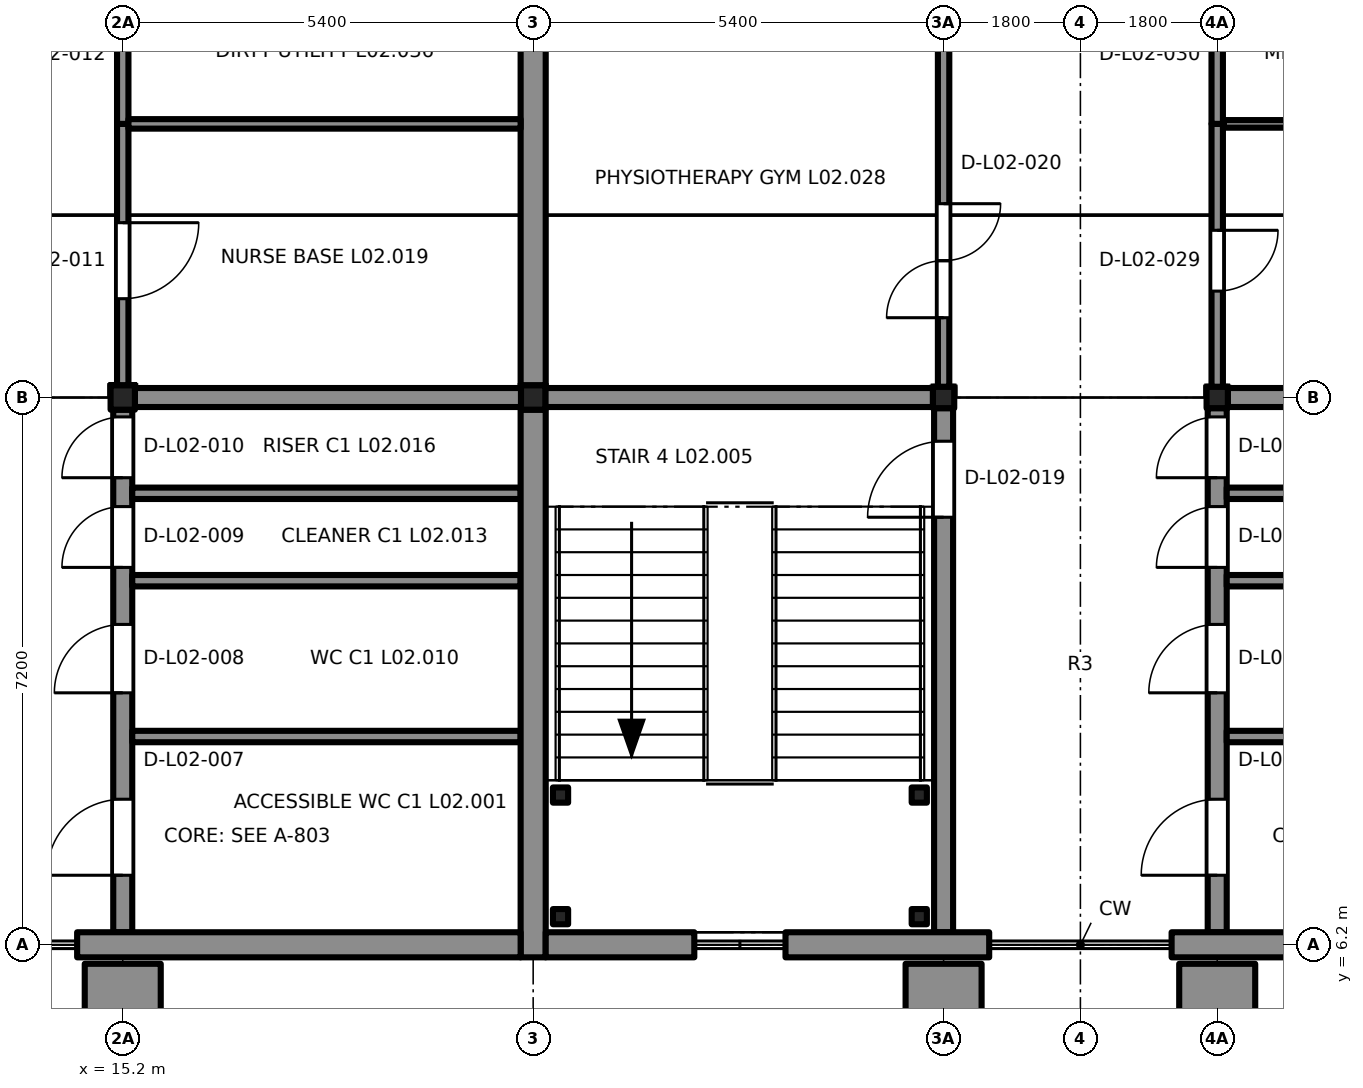
"""IFC4 building model, lengths in metres.
Left out: names, types, materials, properties, quantities, classifications, styles, units other than length and angle.
Written with IfcOpenShell. Run it as: python <this file> out.ifc"""

import sys

from ifc_helpers import new_model, si_unit, direction, frame, frame_2d, origin, origin_2d, place, context, subcontext, project, spatial, rectangle, extrude, element, fill, save


model = new_model("IFC4")
c1 = context("Model", 3, precision=1e-05, world=origin(), true_north=direction((0.0, 1.0)))
c2 = subcontext(c1, "Body", "Model", "MODEL_VIEW")
j1 = project(units=[si_unit("LENGTHUNIT", "METRE"), si_unit("PLANEANGLEUNIT", "RADIAN")], contexts=[c1])
p1 = place(None, origin())
s1 = spatial("IfcSite", under=j1, at=p1, CompositionType="ELEMENT")
p2 = place(p1, origin())
s2 = spatial("IfcBuilding", under=s1, at=p2, CompositionType="ELEMENT")
p3 = place(p2, frame((0.0, 0.0, 10.2)))
s3 = spatial("IfcBuildingStorey", under=s2, at=p3, CompositionType="ELEMENT", Elevation=10.2)
for number, where, z_axis, x_axis in (
    (1, (15.2, 13.4, 0.0), (0.0, 0.0, 1.0), (1.0, 0.0, 0.0)),
    (2, (20.6, 13.4, 0.0), (0.0, 0.0, 1.0), (1.0, 0.0, 0.0)),
):
    element("IfcColumn", number, at=place(p3, frame(where, z_axis=z_axis, x_axis=x_axis)), inside=s3, PredefinedType="COLUMN", context=c2, shape_type="SweptSolid", body=[
        extrude(rectangle(XDim=0.32, YDim=0.32, at=origin_2d()), origin(), (0.0, 0.0, 1.0), 3.9),
    ])
for number, where, z_axis, x_axis in (
    (3, (26.0, 13.4, 0.0), (0.0, 0.0, 1.0), (1.0, 0.0, 0.0)),
    (4, (29.6, 13.4, 0.0), (0.0, 0.0, 1.0), (1.0, 0.0, 0.0)),
):
    element("IfcColumn", number, at=place(p3, frame(where, z_axis=z_axis, x_axis=x_axis)), inside=s3, PredefinedType="COLUMN", context=c2, shape_type="SweptSolid", body=[
        extrude(rectangle(XDim=0.28, YDim=0.28, at=origin_2d()), origin(), (0.0, 0.0, 1.0), 3.9),
    ])
p4 = place(p3, frame((15.2, 6.365, 0.0), z_axis=(0.0, 0.0, 1.0), x_axis=(0.0, 1.0, 0.0)))
e5 = element("IfcWall", 5, at=p4, inside=s3, PredefinedType="SHEAR", context=c2, shape_type="SweptSolid", body=[
    extrude(rectangle(XDim=6.875, YDim=0.25, at=frame_2d((3.438, 0.0))), origin(), (0.0, 0.0, 1.0), 3.65),
])
p5 = place(p4, frame((0.75, 0.0, 0.0)))
e6 = element("IfcOpeningElement", 6, at=p5, cuts=e5, PredefinedType="OPENING", context=c2, shape_type="SweptSolid", body=[
    extrude(rectangle(XDim=1.0, YDim=2.1, at=frame_2d((0.5, 1.05))), frame((0.0, 0.135, 0.0), z_axis=(0.0, -1.0, 0.0), x_axis=(1.0, 0.0, 0.0)), (0.0, 0.0, 1.0), 0.27),
])
p6 = place(p4, frame((3.15, 0.0, 0.0)))
e7 = element("IfcOpeningElement", 7, at=p6, cuts=e5, PredefinedType="OPENING", context=c2, shape_type="SweptSolid", body=[
    extrude(rectangle(XDim=0.9, YDim=2.1, at=frame_2d((0.45, 1.05))), frame((0.0, 0.135, 0.0), z_axis=(0.0, -1.0, 0.0), x_axis=(1.0, 0.0, 0.0)), (0.0, 0.0, 1.0), 0.27),
])
p7 = place(p4, frame((4.8, 0.0, 0.0)))
e8 = element("IfcOpeningElement", 8, at=p7, cuts=e5, PredefinedType="OPENING", context=c2, shape_type="SweptSolid", body=[
    extrude(rectangle(XDim=0.8, YDim=2.1, at=frame_2d((0.4, 1.05))), frame((0.0, 0.135, 0.0), z_axis=(0.0, -1.0, 0.0), x_axis=(1.0, 0.0, 0.0)), (0.0, 0.0, 1.0), 0.27),
])
p8 = place(p4, frame((5.98, 0.0, 0.0)))
e9 = element("IfcOpeningElement", 9, at=p8, cuts=e5, PredefinedType="OPENING", context=c2, shape_type="SweptSolid", body=[
    extrude(rectangle(XDim=0.8, YDim=2.1, at=frame_2d((0.4, 1.05))), frame((0.0, 0.135, 0.0), z_axis=(0.0, -1.0, 0.0), x_axis=(1.0, 0.0, 0.0)), (0.0, 0.0, 1.0), 0.27),
])
p9 = place(p3, frame((15.36, 13.4, 0.0), z_axis=(0.0, 0.0, 1.0), x_axis=(1.0, 0.0, 0.0)))
e10 = element("IfcWall", 10, at=p9, inside=s3, PredefinedType="SHEAR", context=c2, shape_type="SweptSolid", body=[
    extrude(rectangle(XDim=5.08, YDim=0.25, at=frame_2d((2.54, 0.0))), origin(), (0.0, 0.0, 1.0), 3.65),
])
for number, where, z_axis, x_axis in (
    (11, (15.325, 8.94, 0.0), (0.0, 0.0, 1.0), (1.0, 0.0, 0.0)),
    (12, (15.325, 10.99, 0.0), (0.0, 0.0, 1.0), (1.0, 0.0, 0.0)),
    (13, (15.325, 12.14, 0.0), (0.0, 0.0, 1.0), (1.0, 0.0, 0.0)),
):
    element("IfcWall", number, at=place(p3, frame(where, z_axis=z_axis, x_axis=x_axis)), inside=s3, PredefinedType="PARTITIONING", context=c2, shape_type="SweptSolid", body=[
        extrude(rectangle(XDim=5.11, YDim=0.15, at=frame_2d((2.555, 0.0))), origin(), (0.0, 0.0, 1.0), 3.65),
    ])
p10 = place(p3, frame((26.0, 6.365, 0.0), z_axis=(0.0, 0.0, 1.0), x_axis=(0.0, 1.0, 0.0)))
e14 = element("IfcWall", 14, at=p10, inside=s3, PredefinedType="SHEAR", context=c2, shape_type="SweptSolid", body=[
    extrude(rectangle(XDim=6.895, YDim=0.25, at=frame_2d((3.448, 0.0))), origin(), (0.0, 0.0, 1.0), 3.65),
])
p11 = place(p10, frame((5.46, 0.0, 0.0)))
e15 = element("IfcOpeningElement", 15, at=p11, cuts=e14, PredefinedType="OPENING", context=c2, shape_type="SweptSolid", body=[
    extrude(rectangle(XDim=1.0, YDim=2.1, at=frame_2d((0.5, 1.05))), frame((0.0, 0.135, 0.0), z_axis=(0.0, -1.0, 0.0), x_axis=(1.0, 0.0, 0.0)), (0.0, 0.0, 1.0), 0.27),
])
p12 = place(p3, frame((20.76, 13.4, 0.0), z_axis=(0.0, 0.0, 1.0), x_axis=(1.0, 0.0, 0.0)))
e16 = element("IfcWall", 16, at=p12, inside=s3, PredefinedType="SHEAR", context=c2, shape_type="SweptSolid", body=[
    extrude(rectangle(XDim=5.1, YDim=0.25, at=frame_2d((2.55, 0.0))), origin(), (0.0, 0.0, 1.0), 3.65),
])
p13 = place(p3, frame((29.6, 6.365, 0.0), z_axis=(0.0, 0.0, 1.0), x_axis=(0.0, 1.0, 0.0)))
e17 = element("IfcWall", 17, at=p13, inside=s3, PredefinedType="SHEAR", context=c2, shape_type="SweptSolid", body=[
    extrude(rectangle(XDim=6.895, YDim=0.25, at=frame_2d((3.448, 0.0))), origin(), (0.0, 0.0, 1.0), 3.65),
])
p14 = place(p13, frame((0.75, 0.0, 0.0)))
e18 = element("IfcOpeningElement", 18, at=p14, cuts=e17, PredefinedType="OPENING", context=c2, shape_type="SweptSolid", body=[
    extrude(rectangle(XDim=1.0, YDim=2.1, at=frame_2d((0.5, 1.05))), frame((0.0, 0.135, 0.0), z_axis=(0.0, -1.0, 0.0), x_axis=(1.0, 0.0, 0.0)), (0.0, 0.0, 1.0), 0.27),
])
p15 = place(p13, frame((3.15, 0.0, 0.0)))
e19 = element("IfcOpeningElement", 19, at=p15, cuts=e17, PredefinedType="OPENING", context=c2, shape_type="SweptSolid", body=[
    extrude(rectangle(XDim=0.9, YDim=2.1, at=frame_2d((0.45, 1.05))), frame((0.0, 0.135, 0.0), z_axis=(0.0, -1.0, 0.0), x_axis=(1.0, 0.0, 0.0)), (0.0, 0.0, 1.0), 0.27),
])
p16 = place(p13, frame((4.8, 0.0, 0.0)))
e20 = element("IfcOpeningElement", 20, at=p16, cuts=e17, PredefinedType="OPENING", context=c2, shape_type="SweptSolid", body=[
    extrude(rectangle(XDim=0.8, YDim=2.1, at=frame_2d((0.4, 1.05))), frame((0.0, 0.135, 0.0), z_axis=(0.0, -1.0, 0.0), x_axis=(1.0, 0.0, 0.0)), (0.0, 0.0, 1.0), 0.27),
])
p17 = place(p13, frame((5.98, 0.0, 0.0)))
e21 = element("IfcOpeningElement", 21, at=p17, cuts=e17, PredefinedType="OPENING", context=c2, shape_type="SweptSolid", body=[
    extrude(rectangle(XDim=0.8, YDim=2.1, at=frame_2d((0.4, 1.05))), frame((0.0, 0.135, 0.0), z_axis=(0.0, -1.0, 0.0), x_axis=(1.0, 0.0, 0.0)), (0.0, 0.0, 1.0), 0.27),
])
p18 = place(p3, frame((29.74, 13.4, 0.0), z_axis=(0.0, 0.0, 1.0), x_axis=(1.0, 0.0, 0.0)))
e22 = element("IfcWall", 22, at=p18, inside=s3, PredefinedType="SHEAR", context=c2, shape_type="SweptSolid", body=[
    extrude(rectangle(XDim=5.12, YDim=0.25, at=frame_2d((2.56, 0.0))), origin(), (0.0, 0.0, 1.0), 3.65),
])
for number, where, z_axis, x_axis in (
    (23, (29.725, 8.94, 0.0), (0.0, 0.0, 1.0), (1.0, 0.0, 0.0)),
    (24, (29.725, 10.99, 0.0), (0.0, 0.0, 1.0), (1.0, 0.0, 0.0)),
    (25, (29.725, 12.14, 0.0), (0.0, 0.0, 1.0), (1.0, 0.0, 0.0)),
):
    element("IfcWall", number, at=place(p3, frame(where, z_axis=z_axis, x_axis=x_axis)), inside=s3, PredefinedType="PARTITIONING", context=c2, shape_type="SweptSolid", body=[
        extrude(rectangle(XDim=5.11, YDim=0.15, at=frame_2d((2.555, 0.0))), origin(), (0.0, 0.0, 1.0), 3.65),
    ])
for number, where, z_axis, x_axis in (
    (26, (20.96, 6.57, 0.0), (0.0, 0.0, 1.0), (1.0, 0.0, 0.0)),
    (27, (25.68, 6.57, 0.0), (0.0, 0.0, 1.0), (1.0, 0.0, 0.0)),
    (28, (20.96, 8.17, 0.0), (0.0, 0.0, 1.0), (1.0, 0.0, 0.0)),
    (29, (25.68, 8.17, 0.0), (0.0, 0.0, 1.0), (1.0, 0.0, 0.0)),
):
    element("IfcColumn", number, at=place(p3, frame(where, z_axis=z_axis, x_axis=x_axis)), inside=s3, PredefinedType="COLUMN", context=c2, shape_type="SweptSolid", body=[
        extrude(rectangle(XDim=0.2, YDim=0.2, at=origin_2d()), origin(), (0.0, 0.0, 1.0), 1.75),
    ])
p19 = place(p3, frame((20.6, 13.24, 0.0), z_axis=(0.0, 0.0, 1.0), x_axis=(0.0, -1.0, 0.0)))
e30 = element("IfcWall", 30, at=p19, inside=s3, PredefinedType="SOLIDWALL", context=c2, shape_type="SweptSolid", body=[
    extrude(rectangle(XDim=7.205, YDim=0.33, at=frame_2d((3.603, 0.0))), origin(), (0.0, 0.0, 1.0), 3.22),
])
p20 = place(p3, frame((20.6, 20.44, 0.0), z_axis=(0.0, 0.0, 1.0), x_axis=(0.0, -1.0, 0.0)))
e31 = element("IfcWall", 31, at=p20, inside=s3, PredefinedType="SOLIDWALL", context=c2, shape_type="SweptSolid", body=[
    extrude(rectangle(XDim=6.88, YDim=0.33, at=frame_2d((3.44, 0.0))), origin(), (0.0, 0.0, 1.0), 3.22),
])
p21 = place(p3, frame((20.435, 6.2, 0.0), z_axis=(0.0, 0.0, 1.0), x_axis=(-1.0, 0.0, 0.0)))
e32 = element("IfcWall", 32, at=p21, inside=s3, PredefinedType="SOLIDWALL", context=c2, shape_type="SweptSolid", body=[
    extrude(rectangle(XDim=5.835, YDim=0.33, at=frame_2d((2.917, 0.0))), origin(), (0.0, 0.0, 1.0), 3.2),
])
p22 = place(p3, frame((15.7, 5.575, 0.0), z_axis=(0.0, 0.0, 1.0), x_axis=(-1.0, 0.0, 0.0)))
e33 = element("IfcWall", 33, at=p22, inside=s3, PredefinedType="SOLIDWALL", context=c2, shape_type="SweptSolid", body=[
    extrude(rectangle(XDim=1.0, YDim=0.75, at=frame_2d((0.5, 0.0))), origin(), (0.0, 0.0, 1.0), 3.9),
])
p23 = place(p3, frame((22.72, 6.2, 0.0), z_axis=(0.0, 0.0, 1.0), x_axis=(-1.0, 0.0, 0.0)))
e34 = element("IfcWall", 34, at=p23, inside=s3, PredefinedType="SOLIDWALL", context=c2, shape_type="SweptSolid", body=[
    extrude(rectangle(XDim=1.955, YDim=0.33, at=frame_2d((0.978, 0.0))), origin(), (0.0, 0.0, 1.0), 3.2),
])
p24 = place(p3, frame((26.6, 6.2, 0.0), z_axis=(0.0, 0.0, 1.0), x_axis=(-1.0, 0.0, 0.0)))
e35 = element("IfcWall", 35, at=p24, inside=s3, PredefinedType="SOLIDWALL", context=c2, shape_type="SweptSolid", body=[
    extrude(rectangle(XDim=2.68, YDim=0.33, at=frame_2d((1.34, 0.0))), origin(), (0.0, 0.0, 1.0), 3.2),
])
p25 = place(p3, frame((33.469, 6.2, 0.0), z_axis=(0.0, 0.0, 1.0), x_axis=(-1.0, 0.0, 0.0)))
e36 = element("IfcWall", 36, at=p25, inside=s3, PredefinedType="SOLIDWALL", context=c2, shape_type="SweptSolid", body=[
    extrude(rectangle(XDim=4.469, YDim=0.33, at=frame_2d((2.234, 0.0))), origin(), (0.0, 0.0, 1.0), 3.2),
])
for number, where, z_axis, x_axis in (
    (37, (26.5, 5.575, 0.0), (0.0, 0.0, 1.0), (-1.0, 0.0, 0.0)),
    (38, (30.1, 5.575, 0.0), (0.0, 0.0, 1.0), (-1.0, 0.0, 0.0)),
):
    element("IfcWall", number, at=place(p3, frame(where, z_axis=z_axis, x_axis=x_axis)), inside=s3, PredefinedType="SOLIDWALL", context=c2, shape_type="SweptSolid", body=[
        extrude(rectangle(XDim=1.0, YDim=0.75, at=frame_2d((0.5, 0.0))), origin(), (0.0, 0.0, 1.0), 3.9),
    ])
p26 = place(p3, frame((15.2, 17.0, 0.0), z_axis=(0.0, 0.0, 1.0), x_axis=(0.0, -1.0, 0.0)))
e39 = element("IfcWall", 39, at=p26, inside=s3, PredefinedType="PARTITIONING", context=c2, shape_type="SweptSolid", body=[
    extrude(rectangle(XDim=3.44, YDim=0.15, at=frame_2d((1.72, 0.0))), origin(), (0.0, 0.0, 1.0), 3.22),
])
p27 = place(p26, frame((1.3, 0.0, 0.0)))
e40 = element("IfcOpeningElement", 40, at=p27, cuts=e39, PredefinedType="OPENING", context=c2, shape_type="SweptSolid", body=[
    extrude(rectangle(XDim=1.0, YDim=2.1, at=frame_2d((0.5, 1.05))), frame((0.0, 0.085, 0.0), z_axis=(0.0, -1.0, 0.0), x_axis=(1.0, 0.0, 0.0)), (0.0, 0.0, 1.0), 0.17),
])
p28 = place(p3, frame((15.2, 20.44, 0.0), z_axis=(0.0, 0.0, 1.0), x_axis=(0.0, -1.0, 0.0)))
e41 = element("IfcWall", 41, at=p28, inside=s3, PredefinedType="PARTITIONING", context=c2, shape_type="SweptSolid", body=[
    extrude(rectangle(XDim=3.44, YDim=0.15, at=frame_2d((1.72, 0.0))), origin(), (0.0, 0.0, 1.0), 3.22),
])
p29 = place(p28, frame((1.24, 0.0, 0.0)))
e42 = element("IfcOpeningElement", 42, at=p29, cuts=e41, PredefinedType="OPENING", context=c2, shape_type="SweptSolid", body=[
    extrude(rectangle(XDim=0.8, YDim=2.1, at=frame_2d((0.4, 1.05))), frame((0.0, 0.085, 0.0), z_axis=(0.0, -1.0, 0.0), x_axis=(1.0, 0.0, 0.0)), (0.0, 0.0, 1.0), 0.17),
])
p30 = place(p3, frame((20.435, 17.0, 0.0), z_axis=(0.0, 0.0, 1.0), x_axis=(-1.0, 0.0, 0.0)))
e43 = element("IfcWall", 43, at=p30, inside=s3, PredefinedType="PARTITIONING", context=c2, shape_type="SweptSolid", body=[
    extrude(rectangle(XDim=5.16, YDim=0.125, at=frame_2d((2.58, 0.0))), origin(), (0.0, 0.0, 1.0), 3.38),
])
p31 = place(p3, frame((26.0, 13.54, 0.0), z_axis=(0.0, 0.0, 1.0), x_axis=(0.0, 1.0, 0.0)))
e44 = element("IfcWall", 44, at=p31, inside=s3, PredefinedType="PARTITIONING", context=c2, shape_type="SweptSolid", body=[
    extrude(rectangle(XDim=6.92, YDim=0.15, at=frame_2d((3.46, 0.0))), origin(), (0.0, 0.0, 1.0), 3.22),
])
p32 = place(p31, frame((0.91, 0.0, 0.0)))
e45 = element("IfcOpeningElement", 45, at=p32, cuts=e44, PredefinedType="OPENING", context=c2, shape_type="SweptSolid", body=[
    extrude(rectangle(XDim=1.5, YDim=2.1, at=frame_2d((0.75, 1.05))), frame((0.0, 0.085, 0.0), z_axis=(0.0, -1.0, 0.0), x_axis=(1.0, 0.0, 0.0)), (0.0, 0.0, 1.0), 0.17),
])
p33 = place(p3, frame((29.6, 17.0, 0.0), z_axis=(0.0, 0.0, 1.0), x_axis=(0.0, -1.0, 0.0)))
e46 = element("IfcWall", 46, at=p33, inside=s3, PredefinedType="PARTITIONING", context=c2, shape_type="SweptSolid", body=[
    extrude(rectangle(XDim=3.46, YDim=0.15, at=frame_2d((1.73, 0.0))), origin(), (0.0, 0.0, 1.0), 3.22),
])
p34 = place(p33, frame((1.4, 0.0, 0.0)))
e47 = element("IfcOpeningElement", 47, at=p34, cuts=e46, PredefinedType="OPENING", context=c2, shape_type="SweptSolid", body=[
    extrude(rectangle(XDim=0.8, YDim=2.1, at=frame_2d((0.4, 1.05))), frame((0.0, 0.085, 0.0), z_axis=(0.0, -1.0, 0.0), x_axis=(1.0, 0.0, 0.0)), (0.0, 0.0, 1.0), 0.17),
])
p35 = place(p3, frame((29.6, 20.46, 0.0), z_axis=(0.0, 0.0, 1.0), x_axis=(0.0, -1.0, 0.0)))
e48 = element("IfcWall", 48, at=p35, inside=s3, PredefinedType="PARTITIONING", context=c2, shape_type="SweptSolid", body=[
    extrude(rectangle(XDim=3.46, YDim=0.15, at=frame_2d((1.73, 0.0))), origin(), (0.0, 0.0, 1.0), 3.22),
])
p36 = place(p35, frame((1.26, 0.0, 0.0)))
e49 = element("IfcOpeningElement", 49, at=p36, cuts=e48, PredefinedType="OPENING", context=c2, shape_type="SweptSolid", body=[
    extrude(rectangle(XDim=0.8, YDim=2.1, at=frame_2d((0.4, 1.05))), frame((0.0, 0.085, 0.0), z_axis=(0.0, -1.0, 0.0), x_axis=(1.0, 0.0, 0.0)), (0.0, 0.0, 1.0), 0.17),
])
p37 = place(p3, frame((34.835, 17.0, 0.0), z_axis=(0.0, 0.0, 1.0), x_axis=(-1.0, 0.0, 0.0)))
e50 = element("IfcWall", 50, at=p37, inside=s3, PredefinedType="PARTITIONING", context=c2, shape_type="SweptSolid", body=[
    extrude(rectangle(XDim=5.147, YDim=0.1, at=frame_2d((2.574, 0.0))), origin(), (0.0, 0.0, 1.0), 3.38),
])
p38 = place(p5, origin())
e51 = element("IfcDoor", 51, at=p38, inside=s3, OperationType="SINGLE_SWING_LEFT", PredefinedType="DOOR", context=c2, shape_type="SweptSolid", body=[
    extrude(rectangle(XDim=1.0, YDim=2.1, at=frame_2d((0.5, 1.05))), frame((0.0, 0.025, 0.0), z_axis=(0.0, -1.0, 0.0), x_axis=(1.0, 0.0, 0.0)), (0.0, 0.0, 1.0), 0.05),
])
fill(e6, e51)
p39 = place(p6, origin())
e52 = element("IfcDoor", 52, at=p39, inside=s3, OperationType="SINGLE_SWING_LEFT", PredefinedType="DOOR", context=c2, shape_type="SweptSolid", body=[
    extrude(rectangle(XDim=0.9, YDim=2.1, at=frame_2d((0.45, 1.05))), frame((0.0, 0.025, 0.0), z_axis=(0.0, -1.0, 0.0), x_axis=(1.0, 0.0, 0.0)), (0.0, 0.0, 1.0), 0.05),
])
fill(e7, e52)
p40 = place(p7, origin())
e53 = element("IfcDoor", 53, at=p40, inside=s3, OperationType="SINGLE_SWING_LEFT", PredefinedType="DOOR", context=c2, shape_type="SweptSolid", body=[
    extrude(rectangle(XDim=0.8, YDim=2.1, at=frame_2d((0.4, 1.05))), frame((0.0, 0.025, 0.0), z_axis=(0.0, -1.0, 0.0), x_axis=(1.0, 0.0, 0.0)), (0.0, 0.0, 1.0), 0.05),
])
fill(e8, e53)
p41 = place(p8, origin())
e54 = element("IfcDoor", 54, at=p41, inside=s3, OperationType="SINGLE_SWING_LEFT", PredefinedType="DOOR", context=c2, shape_type="SweptSolid", body=[
    extrude(rectangle(XDim=0.8, YDim=2.1, at=frame_2d((0.4, 1.05))), frame((0.0, 0.025, 0.0), z_axis=(0.0, -1.0, 0.0), x_axis=(1.0, 0.0, 0.0)), (0.0, 0.0, 1.0), 0.05),
])
fill(e9, e54)
p42 = place(p11, origin())
e55 = element("IfcDoor", 55, at=p42, inside=s3, OperationType="SINGLE_SWING_RIGHT", PredefinedType="DOOR", context=c2, shape_type="SweptSolid", body=[
    extrude(rectangle(XDim=1.0, YDim=2.1, at=frame_2d((0.5, 1.05))), frame((0.0, 0.025, 0.0), z_axis=(0.0, -1.0, 0.0), x_axis=(1.0, 0.0, 0.0)), (0.0, 0.0, 1.0), 0.05),
])
fill(e15, e55)
p43 = place(p14, origin())
e56 = element("IfcDoor", 56, at=p43, inside=s3, OperationType="SINGLE_SWING_LEFT", PredefinedType="DOOR", context=c2, shape_type="SweptSolid", body=[
    extrude(rectangle(XDim=1.0, YDim=2.1, at=frame_2d((0.5, 1.05))), frame((0.0, 0.025, 0.0), z_axis=(0.0, -1.0, 0.0), x_axis=(1.0, 0.0, 0.0)), (0.0, 0.0, 1.0), 0.05),
])
fill(e18, e56)
p44 = place(p15, origin())
e57 = element("IfcDoor", 57, at=p44, inside=s3, OperationType="SINGLE_SWING_LEFT", PredefinedType="DOOR", context=c2, shape_type="SweptSolid", body=[
    extrude(rectangle(XDim=0.9, YDim=2.1, at=frame_2d((0.45, 1.05))), frame((0.0, 0.025, 0.0), z_axis=(0.0, -1.0, 0.0), x_axis=(1.0, 0.0, 0.0)), (0.0, 0.0, 1.0), 0.05),
])
fill(e19, e57)
p45 = place(p16, origin())
e58 = element("IfcDoor", 58, at=p45, inside=s3, OperationType="SINGLE_SWING_LEFT", PredefinedType="DOOR", context=c2, shape_type="SweptSolid", body=[
    extrude(rectangle(XDim=0.8, YDim=2.1, at=frame_2d((0.4, 1.05))), frame((0.0, 0.025, 0.0), z_axis=(0.0, -1.0, 0.0), x_axis=(1.0, 0.0, 0.0)), (0.0, 0.0, 1.0), 0.05),
])
fill(e20, e58)
p46 = place(p17, origin())
e59 = element("IfcDoor", 59, at=p46, inside=s3, OperationType="SINGLE_SWING_LEFT", PredefinedType="DOOR", context=c2, shape_type="SweptSolid", body=[
    extrude(rectangle(XDim=0.8, YDim=2.1, at=frame_2d((0.4, 1.05))), frame((0.0, 0.025, 0.0), z_axis=(0.0, -1.0, 0.0), x_axis=(1.0, 0.0, 0.0)), (0.0, 0.0, 1.0), 0.05),
])
fill(e21, e59)
p47 = place(p27, origin())
e60 = element("IfcDoor", 60, at=p47, inside=s3, OperationType="SINGLE_SWING_RIGHT", PredefinedType="DOOR", context=c2, shape_type="SweptSolid", body=[
    extrude(rectangle(XDim=1.0, YDim=2.1, at=frame_2d((0.5, 1.05))), frame((0.0, 0.025, 0.0), z_axis=(0.0, -1.0, 0.0), x_axis=(1.0, 0.0, 0.0)), (0.0, 0.0, 1.0), 0.05),
])
fill(e40, e60)
p48 = place(p32, origin())
e61 = element("IfcDoor", 61, at=p48, inside=s3, OperationType="DOUBLE_DOOR_SINGLE_SWING", PredefinedType="DOOR", context=c2, shape_type="SweptSolid", body=[
    extrude(rectangle(XDim=1.5, YDim=2.1, at=frame_2d((0.75, 1.05))), frame((0.0, 0.025, 0.0), z_axis=(0.0, -1.0, 0.0), x_axis=(1.0, 0.0, 0.0)), (0.0, 0.0, 1.0), 0.05),
])
fill(e45, e61)
p49 = place(p34, origin())
e62 = element("IfcDoor", 62, at=p49, inside=s3, OperationType="SINGLE_SWING_RIGHT", PredefinedType="DOOR", context=c2, shape_type="SweptSolid", body=[
    extrude(rectangle(XDim=0.8, YDim=2.1, at=frame_2d((0.4, 1.05))), frame((0.0, 0.025, 0.0), z_axis=(0.0, -1.0, 0.0), x_axis=(1.0, 0.0, 0.0)), (0.0, 0.0, 1.0), 0.05),
])
fill(e47, e62)
save(model, sys.argv[1])
